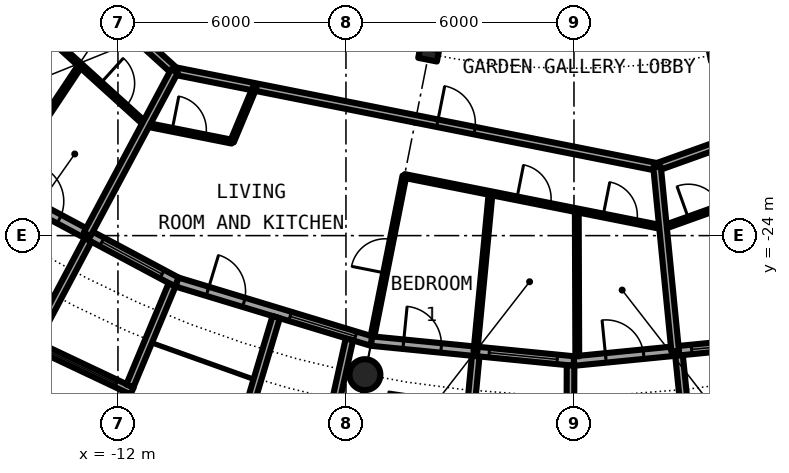
"""IFC4 building model, lengths in metres.
Left out: names, types, materials, properties, quantities, classifications, styles, units other than length and angle.
Written with IfcOpenShell. Run it as: python <this file> out.ifc"""

import sys

from ifc_helpers import new_model, si_unit, direction, frame, frame_2d, origin, origin_2d, place, context, subcontext, project, spatial, rectangle, circle, hollow_circle, i_section, extrude, element, fill, save


model = new_model("IFC4")
c1 = context("Model", 3, precision=1e-05, world=origin(), true_north=direction((0.0, 1.0)))
c2 = subcontext(c1, "Body", "Model", "MODEL_VIEW")
j1 = project(units=[si_unit("LENGTHUNIT", "METRE"), si_unit("PLANEANGLEUNIT", "RADIAN")], contexts=[c1])
p1 = place(None, origin())
s1 = spatial("IfcSite", under=j1, at=p1, CompositionType="ELEMENT")
p2 = place(p1, origin())
s2 = spatial("IfcBuilding", under=s1, at=p2, CompositionType="ELEMENT")
p3 = place(p2, frame((0.0, 0.0, 173.8)))
s3 = spatial("IfcBuildingStorey", under=s2, at=p3, CompositionType="ELEMENT", Elevation=173.8)
p4 = place(p3, frame((-5.501, -27.658, 0.0), z_axis=(0.0, 0.0, 1.0), x_axis=(1.0, 0.0, 0.0)))
e1 = element("IfcColumn", 1, at=p4, inside=s3, PredefinedType="COLUMN", context=c2, shape_type="SweptSolid", body=[
    extrude(hollow_circle(Radius=0.406, WallThickness=0.04, at=origin_2d()), origin(), (0.0, 0.0, 1.0), 3.05),
])
for number, where, z_axis, x_axis in (
    (2, (-3.824, -19.223, 0.0), (0.0, 0.0, 1.0), (-0.195, -0.981, 0.0)),
    (3, (3.824, -19.223, 0.0), (0.0, 0.0, 1.0), (0.195, -0.981, 0.0)),
):
    element("IfcColumn", number, at=place(p3, frame(where, z_axis=z_axis, x_axis=x_axis)), inside=s3, PredefinedType="COLUMN", context=c2, shape_type="SweptSolid", body=[
        extrude(i_section(OverallWidth=0.3, OverallDepth=0.5, WebThickness=0.014, FlangeThickness=0.028, FilletRadius=0.027, at=origin_2d()), origin(), (0.0, 0.0, 1.0), 3.05),
    ])
p5 = place(p3, frame((-15.167, -22.699, 0.0), z_axis=(0.0, 0.0, 1.0), x_axis=(0.881915646801, -0.471407246368, 0.0)))
e4 = element("IfcWall", 4, at=p5, inside=s3, PredefinedType="SOLIDWALL", context=c2, shape_type="SweptSolid", body=[
    extrude(rectangle(XDim=5.352, YDim=0.25, at=frame_2d((2.676, 0.0))), origin(), (0.0, 0.0, 1.0), 2.7),
])
p6 = place(p5, frame((0.841, 0.0, 0.0)))
e5 = element("IfcOpeningElement", 5, at=p6, cuts=e4, PredefinedType="OPENING", context=c2, shape_type="SweptSolid", body=[
    extrude(rectangle(XDim=1.0, YDim=2.2, at=frame_2d((0.5, 1.1))), frame((0.0, 0.135, 0.0), z_axis=(0.0, -1.0, 0.0), x_axis=(1.0, 0.0, 0.0)), (0.0, 0.0, 1.0), 0.27),
])
p7 = place(p5, frame((3.111, 0.0, 0.3)))
e6 = element("IfcOpeningElement", 6, at=p7, cuts=e4, PredefinedType="OPENING", context=c2, shape_type="SweptSolid", body=[
    extrude(rectangle(XDim=1.8, YDim=2.1, at=frame_2d((0.9, 1.05))), frame((0.0, 0.135, 0.0), z_axis=(0.0, -1.0, 0.0), x_axis=(1.0, 0.0, 0.0)), (0.0, 0.0, 1.0), 0.27),
])
p8 = place(p3, frame((-14.335, -26.808, -0.03), z_axis=(0.0, 0.0, 1.0), x_axis=(0.904000060331, -0.427532327342, 0.0)))
e7 = element("IfcWall", 7, at=p8, inside=s3, PredefinedType="SOLIDWALL", context=c2, shape_type="SweptSolid", body=[
    extrude(rectangle(XDim=2.993, YDim=0.2, at=frame_2d((1.497, 0.0))), origin(), (0.0, 0.0, 1.0), 2.73),
])
p9 = place(p8, frame((0.457, 0.0, 0.33)))
e8 = element("IfcOpeningElement", 8, at=p9, cuts=e7, PredefinedType="OPENING", context=c2, shape_type="SweptSolid", body=[
    extrude(circle(Radius=1.04, at=frame_2d((1.04, 1.04))), frame((0.0, 0.11, 0.0), z_axis=(0.0, -1.0, 0.0), x_axis=(1.0, 0.0, 0.0)), (0.0, 0.0, 1.0), 0.22),
])
p10 = place(p3, frame((-12.787, -24.113, -0.03), z_axis=(0.0, 0.0, 1.0), x_axis=(-0.468365282436, -0.883534924159, 0.0)))
e9 = element("IfcWall", 9, at=p10, inside=s3, PredefinedType="SOLIDWALL", context=c2, shape_type="SweptSolid", body=[
    extrude(rectangle(XDim=3.006, YDim=0.2, at=frame_2d((1.503, 0.0))), origin(), (0.0, 0.0, 1.0), 2.73),
])
p11 = place(p3, frame((-10.575, -25.295, -0.03), z_axis=(0.0, 0.0, 1.0), x_axis=(-0.385697364644, -0.922625353492, 0.0)))
e10 = element("IfcWall", 10, at=p11, inside=s3, PredefinedType="SOLIDWALL", context=c2, shape_type="SweptSolid", body=[
    extrude(rectangle(XDim=2.883, YDim=0.2, at=frame_2d((1.442, 0.0))), origin(), (0.0, 0.0, 1.0), 2.73),
])
p12 = place(p3, frame((-10.447, -25.222, 0.0), z_axis=(0.0, 0.0, 1.0), x_axis=(0.956965678721, -0.290201119486, 0.0)))
e11 = element("IfcWall", 11, at=p12, inside=s3, PredefinedType="SOLIDWALL", context=c2, shape_type="SweptSolid", body=[
    extrude(rectangle(XDim=5.351, YDim=0.25, at=frame_2d((2.676, 0.0))), origin(), (0.0, 0.0, 1.0), 2.7),
])
p13 = place(p12, frame((0.841, 0.0, 0.0)))
e12 = element("IfcOpeningElement", 12, at=p13, cuts=e11, PredefinedType="OPENING", context=c2, shape_type="SweptSolid", body=[
    extrude(rectangle(XDim=1.0, YDim=2.2, at=frame_2d((0.5, 1.1))), frame((0.0, 0.135, 0.0), z_axis=(0.0, -1.0, 0.0), x_axis=(1.0, 0.0, 0.0)), (0.0, 0.0, 1.0), 0.27),
])
p14 = place(p12, frame((3.111, 0.0, 0.3)))
e13 = element("IfcOpeningElement", 13, at=p14, cuts=e11, PredefinedType="OPENING", context=c2, shape_type="SweptSolid", body=[
    extrude(rectangle(XDim=1.8, YDim=2.1, at=frame_2d((0.9, 1.05))), frame((0.0, 0.135, 0.0), z_axis=(0.0, -1.0, 0.0), x_axis=(1.0, 0.0, 0.0)), (0.0, 0.0, 1.0), 0.27),
])
p15 = place(p3, frame((-7.837, -26.144, -0.03), z_axis=(0.0, 0.0, 1.0), x_axis=(-0.287064767992, -0.957911174889, 0.0)))
e14 = element("IfcWall", 14, at=p15, inside=s3, PredefinedType="SOLIDWALL", context=c2, shape_type="SweptSolid", body=[
    extrude(rectangle(XDim=3.006, YDim=0.2, at=frame_2d((1.503, 0.0))), origin(), (0.0, 0.0, 1.0), 2.73),
])
p16 = place(p3, frame((-5.909, -26.729, -0.03), z_axis=(0.0, 0.0, 1.0), x_axis=(-0.216409053917, -0.976302781612, 0.0)))
e15 = element("IfcWall", 15, at=p16, inside=s3, PredefinedType="SOLIDWALL", context=c2, shape_type="SweptSolid", body=[
    extrude(rectangle(XDim=2.925, YDim=0.2, at=frame_2d((1.463, 0.0))), origin(), (0.0, 0.0, 1.0), 2.73),
])
p17 = place(p3, frame((-5.326, -26.775, 0.0), z_axis=(0.0, 0.0, 1.0), x_axis=(0.995173996315, -0.098126026407, 0.0)))
e16 = element("IfcWall", 16, at=p17, inside=s3, PredefinedType="SOLIDWALL", context=c2, shape_type="SweptSolid", body=[
    extrude(rectangle(XDim=5.352, YDim=0.25, at=frame_2d((2.676, 0.0))), origin(), (0.0, 0.0, 1.0), 2.7),
])
p18 = place(p17, frame((0.841, 0.0, 0.0)))
e17 = element("IfcOpeningElement", 17, at=p18, cuts=e16, PredefinedType="OPENING", context=c2, shape_type="SweptSolid", body=[
    extrude(rectangle(XDim=1.0, YDim=2.2, at=frame_2d((0.5, 1.1))), frame((0.0, 0.135, 0.0), z_axis=(0.0, -1.0, 0.0), x_axis=(1.0, 0.0, 0.0)), (0.0, 0.0, 1.0), 0.27),
])
p19 = place(p17, frame((3.111, 0.0, 0.3)))
e18 = element("IfcOpeningElement", 18, at=p19, cuts=e16, PredefinedType="OPENING", context=c2, shape_type="SweptSolid", body=[
    extrude(rectangle(XDim=1.8, YDim=2.1, at=frame_2d((0.9, 1.05))), frame((0.0, 0.135, 0.0), z_axis=(0.0, -1.0, 0.0), x_axis=(1.0, 0.0, 0.0)), (0.0, 0.0, 1.0), 0.27),
])
p20 = place(p3, frame((-2.586, -27.171, -0.03), z_axis=(0.0, 0.0, 1.0), x_axis=(-0.094548432284, -0.995520262954, 0.0)))
e19 = element("IfcWall", 19, at=p20, inside=s3, PredefinedType="SOLIDWALL", context=c2, shape_type="SweptSolid", body=[
    extrude(rectangle(XDim=3.006, YDim=0.2, at=frame_2d((1.503, 0.0))), origin(), (0.0, 0.0, 1.0), 2.73),
])
p21 = place(p3, frame((-0.09, -27.417, -0.03), z_axis=(0.0, 0.0, 1.0), x_axis=(-0.00347308367, -0.999993968827, 0.0)))
e20 = element("IfcWall", 20, at=p21, inside=s3, PredefinedType="SOLIDWALL", context=c2, shape_type="SweptSolid", body=[
    extrude(rectangle(XDim=2.882, YDim=0.2, at=frame_2d((1.441, 0.0))), origin(), (0.0, 0.0, 1.0), 2.73),
])
p22 = place(p3, frame((0.0, -27.3, 0.0), z_axis=(0.0, 0.0, 1.0), x_axis=(0.995173996315, 0.098126026407, 0.0)))
e21 = element("IfcWall", 21, at=p22, inside=s3, PredefinedType="SOLIDWALL", context=c2, shape_type="SweptSolid", body=[
    extrude(rectangle(XDim=5.352, YDim=0.25, at=frame_2d((2.676, 0.0))), origin(), (0.0, 0.0, 1.0), 2.7),
])
p23 = place(p22, frame((0.841, 0.0, 0.0)))
e22 = element("IfcOpeningElement", 22, at=p23, cuts=e21, PredefinedType="OPENING", context=c2, shape_type="SweptSolid", body=[
    extrude(rectangle(XDim=1.0, YDim=2.2, at=frame_2d((0.5, 1.1))), frame((0.0, 0.135, 0.0), z_axis=(0.0, -1.0, 0.0), x_axis=(1.0, 0.0, 0.0)), (0.0, 0.0, 1.0), 0.27),
])
p24 = place(p22, frame((3.111, 0.0, 0.3)))
e23 = element("IfcOpeningElement", 23, at=p24, cuts=e21, PredefinedType="OPENING", context=c2, shape_type="SweptSolid", body=[
    extrude(rectangle(XDim=1.8, YDim=2.1, at=frame_2d((0.9, 1.05))), frame((0.0, 0.135, 0.0), z_axis=(0.0, -1.0, 0.0), x_axis=(1.0, 0.0, 0.0)), (0.0, 0.0, 1.0), 0.27),
])
p25 = place(p3, frame((2.764, -27.153, -0.03), z_axis=(0.0, 0.0, 1.0), x_axis=(0.101505487237, -0.994834979311, 0.0)))
e24 = element("IfcWall", 24, at=p25, inside=s3, PredefinedType="SOLIDWALL", context=c2, shape_type="SweptSolid", body=[
    extrude(rectangle(XDim=3.007, YDim=0.2, at=frame_2d((1.503, 0.0))), origin(), (0.0, 0.0, 1.0), 2.73),
])
p26 = place(p3, frame((-16.432, -16.396, 0.0), z_axis=(0.0, 0.0, 1.0), x_axis=(0.740901429238, -0.671613781986, 0.0)))
e25 = element("IfcWall", 25, at=p26, inside=s3, PredefinedType="PARTITIONING", context=c2, shape_type="SweptSolid", body=[
    extrude(rectangle(XDim=6.97, YDim=0.1, at=frame_2d((3.485, 0.0))), origin(), (0.0, 0.0, 1.0), 2.7),
])
p27 = place(p26, frame((3.038, 0.0, 0.0)))
e26 = element("IfcOpeningElement", 26, at=p27, cuts=e25, PredefinedType="OPENING", context=c2, shape_type="SweptSolid", body=[
    extrude(rectangle(XDim=0.9, YDim=2.3, at=frame_2d((0.45, 1.15))), frame((0.0, 0.06, 0.0), z_axis=(0.0, -1.0, 0.0), x_axis=(1.0, 0.0, 0.0)), (0.0, 0.0, 1.0), 0.12),
])
p28 = place(p26, frame((5.36, 0.0, 0.0)))
e27 = element("IfcOpeningElement", 27, at=p28, cuts=e25, PredefinedType="OPENING", context=c2, shape_type="SweptSolid", body=[
    extrude(rectangle(XDim=0.9, YDim=2.3, at=frame_2d((0.45, 1.15))), frame((0.0, 0.06, 0.0), z_axis=(0.0, -1.0, 0.0), x_axis=(1.0, 0.0, 0.0)), (0.0, 0.0, 1.0), 0.12),
])
p29 = place(p3, frame((2.347, -23.786, 0.0), z_axis=(0.0, 0.0, 1.0), x_axis=(0.941468908751, 0.33709982773, 0.0)))
e28 = element("IfcWall", 28, at=p29, inside=s3, PredefinedType="PARTITIONING", context=c2, shape_type="SweptSolid", body=[
    extrude(rectangle(XDim=6.968, YDim=0.1, at=frame_2d((3.484, 0.0))), origin(), (0.0, 0.0, 1.0), 2.7),
])
p30 = place(p29, frame((3.034, 0.0, 0.0)))
e29 = element("IfcOpeningElement", 29, at=p30, cuts=e28, PredefinedType="OPENING", context=c2, shape_type="SweptSolid", body=[
    extrude(rectangle(XDim=0.9, YDim=2.3, at=frame_2d((0.45, 1.15))), frame((0.0, 0.06, 0.0), z_axis=(0.0, -1.0, 0.0), x_axis=(1.0, 0.0, 0.0)), (0.0, 0.0, 1.0), 0.12),
])
p31 = place(p29, frame((0.708, 0.0, 0.0)))
e30 = element("IfcOpeningElement", 30, at=p31, cuts=e28, PredefinedType="OPENING", context=c2, shape_type="SweptSolid", body=[
    extrude(rectangle(XDim=0.9, YDim=2.3, at=frame_2d((0.45, 1.15))), frame((0.0, 0.06, 0.0), z_axis=(0.0, -1.0, 0.0), x_axis=(1.0, 0.0, 0.0)), (0.0, 0.0, 1.0), 0.12),
])
p32 = place(p3, frame((-11.268, -21.077, 0.0), z_axis=(0.0, 0.0, 1.0), x_axis=(0.980783177308, -0.19510089469, 0.0)))
e31 = element("IfcWall", 31, at=p32, inside=s3, PredefinedType="PARTITIONING", context=c2, shape_type="SweptSolid", body=[
    extrude(rectangle(XDim=2.312, YDim=0.1, at=frame_2d((1.156, 0.0))), origin(), (0.0, 0.0, 1.0), 2.7),
])
p33 = place(p32, frame((0.708, 0.0, 0.0)))
e32 = element("IfcOpeningElement", 32, at=p33, cuts=e31, PredefinedType="OPENING", context=c2, shape_type="SweptSolid", body=[
    extrude(rectangle(XDim=0.9, YDim=2.3, at=frame_2d((0.45, 1.15))), frame((0.0, 0.06, 0.0), z_axis=(0.0, -1.0, 0.0), x_axis=(1.0, 0.0, 0.0)), (0.0, 0.0, 1.0), 0.12),
])
p34 = place(p3, frame((-4.462, -22.431, 0.0), z_axis=(0.0, 0.0, 1.0), x_axis=(0.980773728025, -0.195148390759, 0.0)))
e33 = element("IfcWall", 33, at=p34, inside=s3, PredefinedType="PARTITIONING", context=c2, shape_type="SweptSolid", body=[
    extrude(rectangle(XDim=6.938, YDim=0.1, at=frame_2d((3.469, 0.0))), origin(), (0.0, 0.0, 1.0), 2.7),
])
p35 = place(p34, frame((3.018, 0.0, 0.0)))
e34 = element("IfcOpeningElement", 34, at=p35, cuts=e33, PredefinedType="OPENING", context=c2, shape_type="SweptSolid", body=[
    extrude(rectangle(XDim=0.9, YDim=2.3, at=frame_2d((0.45, 1.15))), frame((0.0, 0.06, 0.0), z_axis=(0.0, -1.0, 0.0), x_axis=(1.0, 0.0, 0.0)), (0.0, 0.0, 1.0), 0.12),
])
p36 = place(p34, frame((5.332, 0.0, 0.0)))
e35 = element("IfcOpeningElement", 35, at=p36, cuts=e33, PredefinedType="OPENING", context=c2, shape_type="SweptSolid", body=[
    extrude(rectangle(XDim=0.9, YDim=2.3, at=frame_2d((0.45, 1.15))), frame((0.0, 0.06, 0.0), z_axis=(0.0, -1.0, 0.0), x_axis=(1.0, 0.0, 0.0)), (0.0, 0.0, 1.0), 0.12),
])
p37 = place(p3, frame((-18.542, -12.389, 0.0), z_axis=(0.0, 0.0, 1.0), x_axis=(0.740947367223, -0.671563101283, 0.0)))
e36 = element("IfcWall", 36, at=p37, inside=s3, PredefinedType="PARTITIONING", context=c2, shape_type="SweptSolid", body=[
    extrude(rectangle(XDim=10.837, YDim=0.2, at=frame_2d((5.419, 0.0))), origin(), (0.0, 0.0, 1.0), 2.7),
])
p38 = place(p37, frame((6.002, 0.0, 0.0)))
e37 = element("IfcOpeningElement", 37, at=p38, cuts=e36, PredefinedType="OPENING", context=c2, shape_type="SweptSolid", body=[
    extrude(rectangle(XDim=1.0, YDim=2.3, at=frame_2d((0.5, 1.15))), frame((0.0, 0.11, 0.0), z_axis=(0.0, -1.0, 0.0), x_axis=(1.0, 0.0, 0.0)), (0.0, 0.0, 1.0), 0.22),
])
p39 = place(p3, frame((2.186, -22.193, 0.0), z_axis=(0.0, 0.0, 1.0), x_axis=(0.941530192736, 0.336928621769, 0.0)))
e38 = element("IfcWall", 38, at=p39, inside=s3, PredefinedType="PARTITIONING", context=c2, shape_type="SweptSolid", body=[
    extrude(rectangle(XDim=10.836, YDim=0.2, at=frame_2d((5.418, 0.0))), origin(), (0.0, 0.0, 1.0), 2.7),
])
p40 = place(p39, frame((3.835, 0.0, 0.0)))
e39 = element("IfcOpeningElement", 39, at=p40, cuts=e38, PredefinedType="OPENING", context=c2, shape_type="SweptSolid", body=[
    extrude(rectangle(XDim=1.0, YDim=2.3, at=frame_2d((0.5, 1.15))), frame((0.0, 0.11, 0.0), z_axis=(0.0, -1.0, 0.0), x_axis=(1.0, 0.0, 0.0)), (0.0, 0.0, 1.0), 0.22),
])
p41 = place(p3, frame((-10.512, -19.667, 0.0), z_axis=(0.0, 0.0, 1.0), x_axis=(0.980780341017, -0.195115152343, 0.0)))
e40 = element("IfcWall", 40, at=p41, inside=s3, PredefinedType="PARTITIONING", context=c2, shape_type="SweptSolid", body=[
    extrude(rectangle(XDim=12.947, YDim=0.2, at=frame_2d((6.473, 0.0))), origin(), (0.0, 0.0, 1.0), 2.7),
])
p42 = place(p41, frame((7.052, 0.0, 0.0)))
e41 = element("IfcOpeningElement", 41, at=p42, cuts=e40, PredefinedType="OPENING", context=c2, shape_type="SweptSolid", body=[
    extrude(rectangle(XDim=1.0, YDim=2.3, at=frame_2d((0.5, 1.15))), frame((0.0, 0.11, 0.0), z_axis=(0.0, -1.0, 0.0), x_axis=(1.0, 0.0, 0.0)), (0.0, 0.0, 1.0), 0.22),
])
p43 = place(p3, frame((-15.054, -22.624, 0.0), z_axis=(0.0, 0.0, 1.0), x_axis=(0.553823887887, 0.83263383381, 0.0)))
e42 = element("IfcWall", 42, at=p43, inside=s3, PredefinedType="PARTITIONING", context=c2, shape_type="SweptSolid", body=[
    extrude(rectangle(XDim=3.73, YDim=0.1, at=frame_2d((1.865, 0.0))), origin(), (0.0, 0.0, 1.0), 2.7),
])
p44 = place(p3, frame((-12.81, -23.966, 0.0), z_axis=(0.0, 0.0, 1.0), x_axis=(0.471427642527, 0.881904744211, 0.0)))
e43 = element("IfcWall", 43, at=p44, inside=s3, PredefinedType="PARTITIONING", context=c2, shape_type="SweptSolid", body=[
    extrude(rectangle(XDim=4.875, YDim=0.2, at=frame_2d((2.438, 0.0))), origin(), (0.0, 0.0, 1.0), 2.7),
])
p45 = place(p3, frame((-8.998, -21.529, 0.0), z_axis=(0.0, 0.0, 1.0), x_axis=(0.385469858593, 0.922720427929, 0.0)))
e44 = element("IfcWall", 44, at=p45, inside=s3, PredefinedType="PARTITIONING", context=c2, shape_type="SweptSolid", body=[
    extrude(rectangle(XDim=1.562, YDim=0.1, at=frame_2d((0.781, 0.0))), origin(), (0.0, 0.0, 1.0), 2.7),
])
p46 = place(p3, frame((-5.302, -26.653, 0.0), z_axis=(0.0, 0.0, 1.0), x_axis=(0.195145394338, 0.98077432423, 0.0)))
e45 = element("IfcWall", 45, at=p46, inside=s3, PredefinedType="PARTITIONING", context=c2, shape_type="SweptSolid", body=[
    extrude(rectangle(XDim=4.305, YDim=0.1, at=frame_2d((2.152, 0.0))), origin(), (0.0, 0.0, 1.0), 2.7),
])
p47 = place(p46, frame((1.702, 0.0, 0.0)))
e46 = element("IfcOpeningElement", 46, at=p47, cuts=e45, PredefinedType="OPENING", context=c2, shape_type="SweptSolid", body=[
    extrude(rectangle(XDim=0.9, YDim=2.3, at=frame_2d((0.45, 1.15))), frame((0.0, 0.06, 0.0), z_axis=(0.0, -1.0, 0.0), x_axis=(1.0, 0.0, 0.0)), (0.0, 0.0, 1.0), 0.12),
])
p48 = place(p3, frame((-2.593, -27.051, 0.0), z_axis=(0.0, 0.0, 1.0), x_axis=(0.095276864271, 0.995450812012, 0.0)))
e47 = element("IfcWall", 47, at=p48, inside=s3, PredefinedType="PARTITIONING", context=c2, shape_type="SweptSolid", body=[
    extrude(rectangle(XDim=4.187, YDim=0.1, at=frame_2d((2.094, 0.0))), origin(), (0.0, 0.0, 1.0), 2.7),
])
p49 = place(p3, frame((0.087, -27.175, 0.0), z_axis=(0.0, 0.0, 1.0), x_axis=(-0.003368696325, 0.999994325926, 0.0)))
e48 = element("IfcWall", 48, at=p49, inside=s3, PredefinedType="PARTITIONING", context=c2, shape_type="SweptSolid", body=[
    extrude(rectangle(XDim=3.841, YDim=0.1, at=frame_2d((1.92, 0.0))), origin(), (0.0, 0.0, 1.0), 2.7),
])
p50 = place(p3, frame((2.186, -22.193, 0.0), z_axis=(0.0, 0.0, 1.0), x_axis=(0.098070432075, -0.995179476453, 0.0)))
e49 = element("IfcWall", 49, at=p50, inside=s3, PredefinedType="PARTITIONING", context=c2, shape_type="SweptSolid", body=[
    extrude(rectangle(XDim=4.874, YDim=0.2, at=frame_2d((2.437, 0.0))), origin(), (0.0, 0.0, 1.0), 2.7),
])
p51 = place(p6, origin())
e50 = element("IfcDoor", 50, at=p51, inside=s3, OperationType="SINGLE_SWING_LEFT", PredefinedType="DOOR", context=c2, shape_type="SweptSolid", body=[
    extrude(rectangle(XDim=1.0, YDim=2.2, at=frame_2d((0.5, 1.1))), frame((0.0, 0.025, 0.0), z_axis=(0.0, -1.0, 0.0), x_axis=(1.0, 0.0, 0.0)), (0.0, 0.0, 1.0), 0.05),
])
fill(e5, e50)
p52 = place(p7, origin())
e51 = element("IfcWindow", 51, at=p52, inside=s3, PartitioningType="SINGLE_PANEL", PredefinedType="WINDOW", context=c2, shape_type="SweptSolid", body=[
    extrude(rectangle(XDim=1.8, YDim=2.1, at=frame_2d((0.9, 1.05))), frame((0.0, 0.03, 0.0), z_axis=(0.0, -1.0, 0.0), x_axis=(1.0, 0.0, 0.0)), (0.0, 0.0, 1.0), 0.06),
])
fill(e6, e51)
p53 = place(p9, origin())
e52 = element("IfcWindow", 52, at=p53, inside=s3, PartitioningType="SINGLE_PANEL", PredefinedType="WINDOW", context=c2, shape_type="SweptSolid", body=[
    extrude(circle(Radius=1.04, at=frame_2d((1.04, 1.04))), frame((0.0, 0.03, 0.0), z_axis=(0.0, -1.0, 0.0), x_axis=(1.0, 0.0, 0.0)), (0.0, 0.0, 1.0), 0.06),
])
fill(e8, e52)
p54 = place(p13, origin())
e53 = element("IfcDoor", 53, at=p54, inside=s3, OperationType="SINGLE_SWING_LEFT", PredefinedType="DOOR", context=c2, shape_type="SweptSolid", body=[
    extrude(rectangle(XDim=1.0, YDim=2.2, at=frame_2d((0.5, 1.1))), frame((0.0, 0.025, 0.0), z_axis=(0.0, -1.0, 0.0), x_axis=(1.0, 0.0, 0.0)), (0.0, 0.0, 1.0), 0.05),
])
fill(e12, e53)
p55 = place(p14, origin())
e54 = element("IfcWindow", 54, at=p55, inside=s3, PartitioningType="SINGLE_PANEL", PredefinedType="WINDOW", context=c2, shape_type="SweptSolid", body=[
    extrude(rectangle(XDim=1.8, YDim=2.1, at=frame_2d((0.9, 1.05))), frame((0.0, 0.03, 0.0), z_axis=(0.0, -1.0, 0.0), x_axis=(1.0, 0.0, 0.0)), (0.0, 0.0, 1.0), 0.06),
])
fill(e13, e54)
p56 = place(p18, origin())
e55 = element("IfcDoor", 55, at=p56, inside=s3, OperationType="SINGLE_SWING_LEFT", PredefinedType="DOOR", context=c2, shape_type="SweptSolid", body=[
    extrude(rectangle(XDim=1.0, YDim=2.2, at=frame_2d((0.5, 1.1))), frame((0.0, 0.025, 0.0), z_axis=(0.0, -1.0, 0.0), x_axis=(1.0, 0.0, 0.0)), (0.0, 0.0, 1.0), 0.05),
])
fill(e17, e55)
p57 = place(p19, origin())
e56 = element("IfcWindow", 56, at=p57, inside=s3, PartitioningType="SINGLE_PANEL", PredefinedType="WINDOW", context=c2, shape_type="SweptSolid", body=[
    extrude(rectangle(XDim=1.8, YDim=2.1, at=frame_2d((0.9, 1.05))), frame((0.0, 0.03, 0.0), z_axis=(0.0, -1.0, 0.0), x_axis=(1.0, 0.0, 0.0)), (0.0, 0.0, 1.0), 0.06),
])
fill(e18, e56)
p58 = place(p23, origin())
e57 = element("IfcDoor", 57, at=p58, inside=s3, OperationType="SINGLE_SWING_LEFT", PredefinedType="DOOR", context=c2, shape_type="SweptSolid", body=[
    extrude(rectangle(XDim=1.0, YDim=2.2, at=frame_2d((0.5, 1.1))), frame((0.0, 0.025, 0.0), z_axis=(0.0, -1.0, 0.0), x_axis=(1.0, 0.0, 0.0)), (0.0, 0.0, 1.0), 0.05),
])
fill(e22, e57)
p59 = place(p24, origin())
e58 = element("IfcWindow", 58, at=p59, inside=s3, PartitioningType="SINGLE_PANEL", PredefinedType="WINDOW", context=c2, shape_type="SweptSolid", body=[
    extrude(rectangle(XDim=1.8, YDim=2.1, at=frame_2d((0.9, 1.05))), frame((0.0, 0.03, 0.0), z_axis=(0.0, -1.0, 0.0), x_axis=(1.0, 0.0, 0.0)), (0.0, 0.0, 1.0), 0.06),
])
fill(e23, e58)
p60 = place(p28, origin())
e59 = element("IfcDoor", 59, at=p60, inside=s3, OperationType="SINGLE_SWING_RIGHT", PredefinedType="DOOR", context=c2, shape_type="SweptSolid", body=[
    extrude(rectangle(XDim=0.9, YDim=2.3, at=frame_2d((0.45, 1.15))), frame((0.0, 0.025, 0.0), z_axis=(0.0, -1.0, 0.0), x_axis=(1.0, 0.0, 0.0)), (0.0, 0.0, 1.0), 0.05),
])
fill(e27, e59)
p61 = place(p42, origin())
e60 = element("IfcDoor", 60, at=p61, inside=s3, OperationType="SINGLE_SWING_RIGHT", PredefinedType="DOOR", context=c2, shape_type="SweptSolid", body=[
    extrude(rectangle(XDim=1.0, YDim=2.3, at=frame_2d((0.5, 1.15))), frame((0.0, 0.025, 0.0), z_axis=(0.0, -1.0, 0.0), x_axis=(1.0, 0.0, 0.0)), (0.0, 0.0, 1.0), 0.05),
])
fill(e41, e60)
p62 = place(p33, origin())
e61 = element("IfcDoor", 61, at=p62, inside=s3, OperationType="SINGLE_SWING_RIGHT", PredefinedType="DOOR", context=c2, shape_type="SweptSolid", body=[
    extrude(rectangle(XDim=0.9, YDim=2.3, at=frame_2d((0.45, 1.15))), frame((0.0, 0.025, 0.0), z_axis=(0.0, -1.0, 0.0), x_axis=(1.0, 0.0, 0.0)), (0.0, 0.0, 1.0), 0.05),
])
fill(e32, e61)
p63 = place(p47, origin())
e62 = element("IfcDoor", 62, at=p63, inside=s3, OperationType="SINGLE_SWING_RIGHT", PredefinedType="DOOR", context=c2, shape_type="SweptSolid", body=[
    extrude(rectangle(XDim=0.9, YDim=2.3, at=frame_2d((0.45, 1.15))), frame((0.0, 0.025, 0.0), z_axis=(0.0, -1.0, 0.0), x_axis=(1.0, 0.0, 0.0)), (0.0, 0.0, 1.0), 0.05),
])
fill(e46, e62)
p64 = place(p35, origin())
e63 = element("IfcDoor", 63, at=p64, inside=s3, OperationType="SINGLE_SWING_LEFT", PredefinedType="DOOR", context=c2, shape_type="SweptSolid", body=[
    extrude(rectangle(XDim=0.9, YDim=2.3, at=frame_2d((0.45, 1.15))), frame((0.0, 0.025, 0.0), z_axis=(0.0, -1.0, 0.0), x_axis=(1.0, 0.0, 0.0)), (0.0, 0.0, 1.0), 0.05),
])
fill(e34, e63)
p65 = place(p36, origin())
e64 = element("IfcDoor", 64, at=p65, inside=s3, OperationType="SINGLE_SWING_RIGHT", PredefinedType="DOOR", context=c2, shape_type="SweptSolid", body=[
    extrude(rectangle(XDim=0.9, YDim=2.3, at=frame_2d((0.45, 1.15))), frame((0.0, 0.025, 0.0), z_axis=(0.0, -1.0, 0.0), x_axis=(1.0, 0.0, 0.0)), (0.0, 0.0, 1.0), 0.05),
])
fill(e35, e64)
p66 = place(p31, origin())
e65 = element("IfcDoor", 65, at=p66, inside=s3, OperationType="SINGLE_SWING_LEFT", PredefinedType="DOOR", context=c2, shape_type="SweptSolid", body=[
    extrude(rectangle(XDim=0.9, YDim=2.3, at=frame_2d((0.45, 1.15))), frame((0.0, 0.025, 0.0), z_axis=(0.0, -1.0, 0.0), x_axis=(1.0, 0.0, 0.0)), (0.0, 0.0, 1.0), 0.05),
])
fill(e30, e65)
save(model, sys.argv[1])
